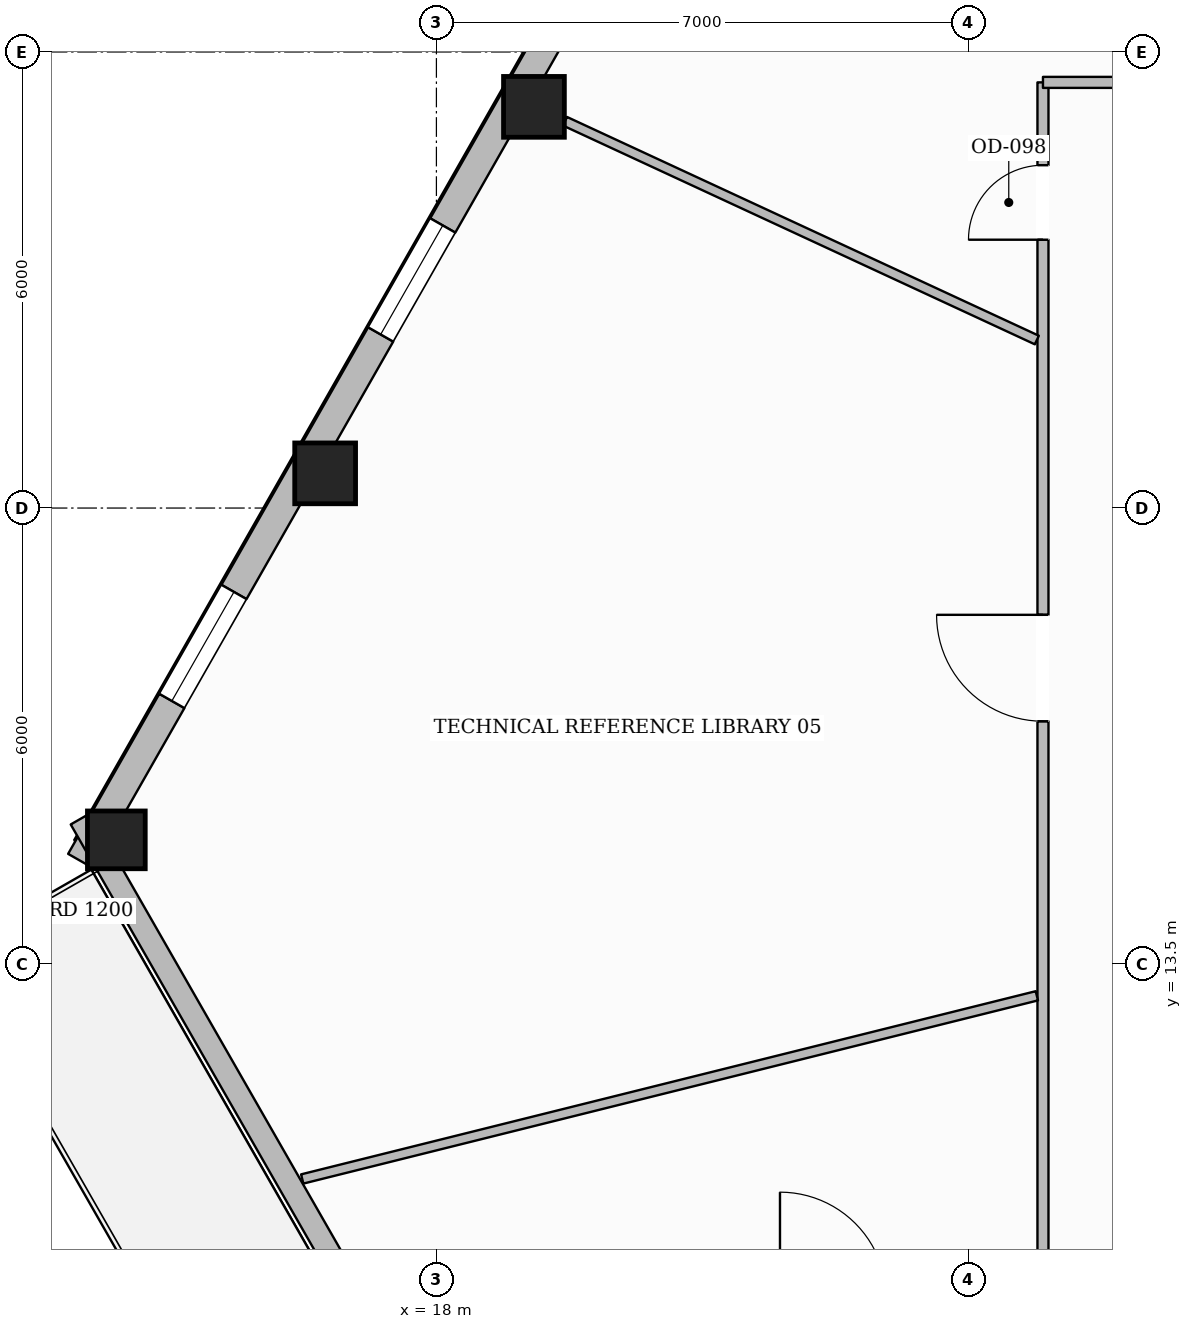
"""IFC4 building model, lengths in metres.
Left out: names, types, materials, properties, quantities, classifications, styles, units other than length and angle.
Written with IfcOpenShell. Run it as: python <this file> out.ifc"""

import sys

from ifc_helpers import new_model, si_unit, direction, frame, frame_2d, origin, origin_2d, place, context, subcontext, project, spatial, rectangle, hollow_rectangle, extrude, element, fill, save


model = new_model("IFC4")
c1 = context("Model", 3, precision=1e-05, world=origin(), true_north=direction((0.0, 1.0)))
c2 = subcontext(c1, "Body", "Model", "MODEL_VIEW")
j1 = project(units=[si_unit("LENGTHUNIT", "METRE"), si_unit("PLANEANGLEUNIT", "RADIAN")], contexts=[c1])
p1 = place(None, origin())
s1 = spatial("IfcSite", under=j1, at=p1, CompositionType="ELEMENT")
p2 = place(p1, origin())
s2 = spatial("IfcBuilding", under=s1, at=p2, CompositionType="ELEMENT")
p3 = place(p2, frame((0.0, 0.0, 32.95)))
s3 = spatial("IfcBuildingStorey", under=s2, at=p3, CompositionType="ELEMENT", Elevation=32.95)
for number, where, z_axis, x_axis in (
    (1, (19.283, 24.778, 0.0), (0.0, 0.0, 1.0), (1.0, 0.0, 0.0)),
    (2, (16.536, 19.956, 0.0), (0.0, 0.0, 1.0), (1.0, 0.0, 0.0)),
):
    element("IfcColumn", number, at=place(p3, frame(where, z_axis=z_axis, x_axis=x_axis)), inside=s3, PredefinedType="COLUMN", context=c2, shape_type="SweptSolid", body=[
        extrude(hollow_rectangle(XDim=0.8, YDim=0.8, WallThickness=0.036, at=origin_2d()), origin(), (0.0, 0.0, 1.0), 3.59),
    ])
p4 = place(p3, frame((13.789, 15.135, 0.0), z_axis=(0.0, 0.0, 1.0), x_axis=(1.0, 0.0, 0.0)))
e3 = element("IfcColumn", 3, at=p4, inside=s3, PredefinedType="COLUMN", context=c2, shape_type="SweptSolid", body=[
    extrude(hollow_rectangle(XDim=0.76, YDim=0.76, WallThickness=0.035, at=origin_2d()), origin(), (0.0, 0.0, 1.0), 3.59),
])
p5 = place(p3, frame((13.32, 14.856, 0.0), z_axis=(0.0, 0.0, 1.0), x_axis=(0.495031565758, 0.868874990378, 0.0)))
e4 = element("IfcWall", 4, at=p5, inside=s3, PredefinedType="STANDARD", context=c2, shape_type="SweptSolid", body=[
    extrude(rectangle(XDim=34.25, YDim=0.38, at=frame_2d((17.125, 0.0))), origin(), (0.0, 0.0, 1.0), 2.97),
])
p6 = place(p5, frame((25.087, 0.0, 0.0)))
e5 = element("IfcOpeningElement", 5, at=p6, cuts=e4, PredefinedType="OPENING", context=c2, shape_type="SweptSolid", body=[
    extrude(rectangle(XDim=1.0, YDim=2.2, at=frame_2d((0.5, 1.1))), frame((0.0, 0.2, 0.0), z_axis=(0.0, -1.0, 0.0), x_axis=(1.0, 0.0, 0.0)), (0.0, 0.0, 1.0), 0.4),
])
p7 = place(p5, frame((30.17, 0.0, 0.65)))
e6 = element("IfcOpeningElement", 6, at=p7, cuts=e4, PredefinedType="OPENING", context=c2, shape_type="SweptSolid", body=[
    extrude(rectangle(XDim=1.65, YDim=1.75, at=frame_2d((0.825, 0.875))), frame((0.0, 0.2, 0.0), z_axis=(0.0, -1.0, 0.0), x_axis=(1.0, 0.0, 0.0)), (0.0, 0.0, 1.0), 0.4),
])
p8 = place(p5, frame((7.973, 0.0, 0.65)))
e7 = element("IfcOpeningElement", 7, at=p8, cuts=e4, PredefinedType="OPENING", context=c2, shape_type="SweptSolid", body=[
    extrude(rectangle(XDim=1.65, YDim=1.75, at=frame_2d((0.825, 0.875))), frame((0.0, 0.2, 0.0), z_axis=(0.0, -1.0, 0.0), x_axis=(1.0, 0.0, 0.0)), (0.0, 0.0, 1.0), 0.4),
])
p9 = place(p5, frame((2.424, 0.0, 0.65)))
e8 = element("IfcOpeningElement", 8, at=p9, cuts=e4, PredefinedType="OPENING", context=c2, shape_type="SweptSolid", body=[
    extrude(rectangle(XDim=1.65, YDim=1.75, at=frame_2d((0.825, 0.875))), frame((0.0, 0.2, 0.0), z_axis=(0.0, -1.0, 0.0), x_axis=(1.0, 0.0, 0.0)), (0.0, 0.0, 1.0), 0.4),
])
p10 = place(p3, frame((21.587, 0.975, 0.0), z_axis=(0.0, 0.0, 1.0), x_axis=(-0.496963642145, 0.867771362967, 0.0)))
e9 = element("IfcWall", 9, at=p10, inside=s3, PredefinedType="STANDARD", context=c2, shape_type="SweptSolid", body=[
    extrude(rectangle(XDim=16.637, YDim=0.3, at=frame_2d((8.319, 0.0))), origin(), (0.0, 0.0, 1.0), 2.97),
])
p11 = place(p10, frame((7.743, 0.0, 0.0)))
e10 = element("IfcOpeningElement", 10, at=p11, cuts=e9, PredefinedType="OPENING", context=c2, shape_type="SweptSolid", body=[
    extrude(rectangle(XDim=1.15, YDim=2.2, at=frame_2d((0.575, 1.1))), frame((0.0, 0.16, 0.0), z_axis=(0.0, -1.0, 0.0), x_axis=(1.0, 0.0, 0.0)), (0.0, 0.0, 1.0), 0.32),
])
p12 = place(p3, frame((25.98, 9.1, 0.0), z_axis=(0.0, 0.0, 1.0), x_axis=(0.0, 1.0, 0.0)))
e11 = element("IfcWall", 11, at=p12, inside=s3, PredefinedType="PARTITIONING", context=c2, shape_type="SweptSolid", body=[
    extrude(rectangle(XDim=16.0, YDim=0.145, at=frame_2d((8.0, 0.0))), origin(), (0.0, 0.0, 1.0), 3.278),
])
p13 = place(p12, frame((13.93, 0.0, 0.0)))
e12 = element("IfcOpeningElement", 12, at=p13, cuts=e11, PredefinedType="OPENING", context=c2, shape_type="SweptSolid", body=[
    extrude(rectangle(XDim=0.98, YDim=2.15, at=frame_2d((0.49, 1.075))), frame((0.0, 0.083, 0.0), z_axis=(0.0, -1.0, 0.0), x_axis=(1.0, 0.0, 0.0)), (0.0, 0.0, 1.0), 0.165),
])
p14 = place(p12, frame((7.595, 0.0, 0.0)))
e13 = element("IfcOpeningElement", 13, at=p14, cuts=e11, PredefinedType="OPENING", context=c2, shape_type="SweptSolid", body=[
    extrude(rectangle(XDim=1.4, YDim=2.2, at=frame_2d((0.7, 1.1))), frame((0.0, 0.083, 0.0), z_axis=(0.0, -1.0, 0.0), x_axis=(1.0, 0.0, 0.0)), (0.0, 0.0, 1.0), 0.165),
])
p15 = place(p3, frame((25.98, 25.1, 0.0), z_axis=(0.0, 0.0, 1.0), x_axis=(1.0, 0.0, 0.0)))
e14 = element("IfcWall", 14, at=p15, inside=s3, PredefinedType="PARTITIONING", context=c2, shape_type="SweptSolid", body=[
    extrude(rectangle(XDim=11.02, YDim=0.145, at=frame_2d((5.51, 0.0))), origin(), (0.0, 0.0, 1.0), 3.59),
])
p16 = place(p15, frame((3.38, 0.0, 0.0)))
e15 = element("IfcOpeningElement", 15, at=p16, cuts=e14, PredefinedType="OPENING", context=c2, shape_type="SweptSolid", body=[
    extrude(rectangle(XDim=0.88, YDim=2.1, at=frame_2d((0.44, 1.05))), frame((0.0, 0.083, 0.0), z_axis=(0.0, -1.0, 0.0), x_axis=(1.0, 0.0, 0.0)), (0.0, 0.0, 1.0), 0.165),
])
p17 = place(p15, frame((5.9, 0.0, 0.0)))
e16 = element("IfcOpeningElement", 16, at=p17, cuts=e14, PredefinedType="OPENING", context=c2, shape_type="SweptSolid", body=[
    extrude(rectangle(XDim=0.88, YDim=2.1, at=frame_2d((0.44, 1.05))), frame((0.0, 0.083, 0.0), z_axis=(0.0, -1.0, 0.0), x_axis=(1.0, 0.0, 0.0)), (0.0, 0.0, 1.0), 0.165),
])
p18 = place(p15, frame((8.28, 0.0, 0.0)))
e17 = element("IfcOpeningElement", 17, at=p18, cuts=e14, PredefinedType="OPENING", context=c2, shape_type="SweptSolid", body=[
    extrude(rectangle(XDim=0.96, YDim=2.1, at=frame_2d((0.48, 1.05))), frame((0.0, 0.083, 0.0), z_axis=(0.0, -1.0, 0.0), x_axis=(1.0, 0.0, 0.0)), (0.0, 0.0, 1.0), 0.165),
])
p19 = place(p3, frame((25.899, 21.71, 0.0), z_axis=(0.0, 0.0, 1.0), x_axis=(-0.907224939094, 0.420645824757, 0.0)))
e18 = element("IfcWall", 18, at=p19, inside=s3, PredefinedType="PARTITIONING", context=c2, shape_type="SweptSolid", body=[
    extrude(rectangle(XDim=6.843, YDim=0.125, at=frame_2d((3.421, 0.0))), origin(), (0.0, 0.0, 1.0), 3.057),
])
p20 = place(p3, frame((25.899, 13.083, 0.0), z_axis=(0.0, 0.0, 1.0), x_axis=(-0.970296575764, -0.241918488463, 0.0)))
e19 = element("IfcWall", 19, at=p20, inside=s3, PredefinedType="PARTITIONING", context=c2, shape_type="SweptSolid", body=[
    extrude(rectangle(XDim=9.961, YDim=0.125, at=frame_2d((4.98, 0.0))), origin(), (0.0, 0.0, 1.0), 3.59),
])
p21 = place(p8, origin())
e20 = element("IfcWindow", 20, at=p21, inside=s3, PartitioningType="SINGLE_PANEL", PredefinedType="WINDOW", context=c2, shape_type="SweptSolid", body=[
    extrude(rectangle(XDim=1.65, YDim=1.75, at=frame_2d((0.825, 0.875))), frame((0.0, 0.03, 0.0), z_axis=(0.0, -1.0, 0.0), x_axis=(1.0, 0.0, 0.0)), (0.0, 0.0, 1.0), 0.06),
])
fill(e7, e20)
p22 = place(p9, origin())
e21 = element("IfcWindow", 21, at=p22, inside=s3, PartitioningType="SINGLE_PANEL", PredefinedType="WINDOW", context=c2, shape_type="SweptSolid", body=[
    extrude(rectangle(XDim=1.65, YDim=1.75, at=frame_2d((0.825, 0.875))), frame((0.0, 0.03, 0.0), z_axis=(0.0, -1.0, 0.0), x_axis=(1.0, 0.0, 0.0)), (0.0, 0.0, 1.0), 0.06),
])
fill(e8, e21)
p23 = place(p13, origin())
e22 = element("IfcDoor", 22, at=p23, inside=s3, OperationType="SINGLE_SWING_LEFT", PredefinedType="DOOR", context=c2, shape_type="SweptSolid", body=[
    extrude(rectangle(XDim=0.98, YDim=2.15, at=frame_2d((0.49, 1.075))), frame((0.0, 0.025, 0.0), z_axis=(0.0, -1.0, 0.0), x_axis=(1.0, 0.0, 0.0)), (0.0, 0.0, 1.0), 0.05),
])
fill(e12, e22)
p24 = place(p14, origin())
e23 = element("IfcDoor", 23, at=p24, inside=s3, OperationType="SINGLE_SWING_RIGHT", PredefinedType="DOOR", context=c2, shape_type="SweptSolid", body=[
    extrude(rectangle(XDim=1.4, YDim=2.2, at=frame_2d((0.7, 1.1))), frame((0.0, 0.025, 0.0), z_axis=(0.0, -1.0, 0.0), x_axis=(1.0, 0.0, 0.0)), (0.0, 0.0, 1.0), 0.05),
])
fill(e13, e23)
save(model, sys.argv[1])
